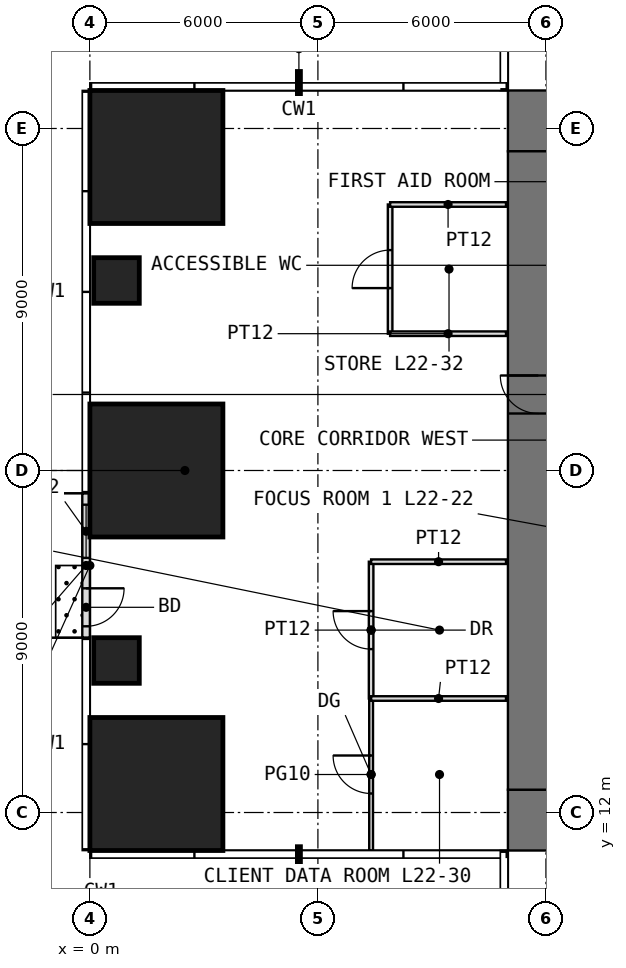
"""IFC4 building model, lengths in metres.
Left out: names, types, materials, properties, quantities, classifications, styles, units other than length and angle.
Written with IfcOpenShell. Run it as: python <this file> out.ifc"""

import sys

from ifc_helpers import new_model, si_unit, direction, frame, frame_2d, origin, origin_2d, place, context, subcontext, project, spatial, rectangle, extrude, element, fill, save


model = new_model("IFC4")
c1 = context("Model", 3, precision=1e-05, world=origin(), true_north=direction((0.0, 1.0)))
c2 = subcontext(c1, "Body", "Model", "MODEL_VIEW")
j1 = project(units=[si_unit("LENGTHUNIT", "METRE"), si_unit("PLANEANGLEUNIT", "RADIAN")], contexts=[c1])
p1 = place(None, origin())
s1 = spatial("IfcSite", under=j1, at=p1, CompositionType="ELEMENT")
p2 = place(p1, origin())
s2 = spatial("IfcBuilding", under=s1, at=p2, CompositionType="ELEMENT")
p3 = place(p2, frame((0.0, 0.0, 96.5)))
s3 = spatial("IfcBuildingStorey", under=s2, at=p3, CompositionType="ELEMENT", Elevation=96.5)
p4 = place(p3, frame((1.75, 12.75, 0.0), z_axis=(0.0, 0.0, 1.0), x_axis=(1.0, 0.0, 0.0)))
e1 = element("IfcColumn", 1, at=p4, inside=s3, PredefinedType="COLUMN", context=c2, shape_type="SweptSolid", body=[
    extrude(rectangle(XDim=3.5, YDim=3.5, at=origin_2d()), origin(), (0.0, 0.0, 1.0), 4.0),
])
p5 = place(p3, frame((0.7, 16.0, 0.0), z_axis=(0.0, 0.0, 1.0), x_axis=(1.0, 0.0, 0.0)))
e2 = element("IfcColumn", 2, at=p5, inside=s3, PredefinedType="COLUMN", context=c2, shape_type="SweptSolid", body=[
    extrude(rectangle(XDim=1.2, YDim=1.2, at=origin_2d()), origin(), (0.0, 0.0, 1.0), 4.0),
])
p6 = place(p3, frame((1.75, 21.0, 0.0), z_axis=(0.0, 0.0, 1.0), x_axis=(1.0, 0.0, 0.0)))
e3 = element("IfcColumn", 3, at=p6, inside=s3, PredefinedType="COLUMN", context=c2, shape_type="SweptSolid", body=[
    extrude(rectangle(XDim=3.5, YDim=3.5, at=origin_2d()), origin(), (0.0, 0.0, 1.0), 4.0),
])
p7 = place(p3, frame((0.7, 26.0, 0.0), z_axis=(0.0, 0.0, 1.0), x_axis=(1.0, 0.0, 0.0)))
e4 = element("IfcColumn", 4, at=p7, inside=s3, PredefinedType="COLUMN", context=c2, shape_type="SweptSolid", body=[
    extrude(rectangle(XDim=1.2, YDim=1.2, at=origin_2d()), origin(), (0.0, 0.0, 1.0), 4.0),
])
p8 = place(p3, frame((1.75, 29.25, 0.0), z_axis=(0.0, 0.0, 1.0), x_axis=(1.0, 0.0, 0.0)))
e5 = element("IfcColumn", 5, at=p8, inside=s3, PredefinedType="COLUMN", context=c2, shape_type="SweptSolid", body=[
    extrude(rectangle(XDim=3.5, YDim=3.5, at=origin_2d()), origin(), (0.0, 0.0, 1.0), 4.0),
])
p9 = place(p3, frame((-0.1, 20.4, 0.0), z_axis=(0.0, 0.0, 1.0), x_axis=(0.0, -1.0, 0.0)))
e6 = element("IfcWall", 6, at=p9, inside=s3, PredefinedType="USERDEFINED", context=c2, shape_type="SweptSolid", body=[
    extrude(rectangle(XDim=3.8, YDim=0.2, at=frame_2d((1.9, 0.0))), origin(), (0.0, 0.0, 1.0), 3.75),
])
p10 = place(p9, frame((2.5, 0.0, 0.0)))
e7 = element("IfcOpeningElement", 7, at=p10, cuts=e6, PredefinedType="OPENING", context=c2, shape_type="SweptSolid", body=[
    extrude(rectangle(XDim=1.0, YDim=2.4, at=frame_2d((0.5, 1.2))), frame((0.0, 0.11, 0.0), z_axis=(0.0, -1.0, 0.0), x_axis=(1.0, 0.0, 0.0)), (0.0, 0.0, 1.0), 0.22),
])
p11 = place(p9, frame((0.3, 0.0, 0.3)))
e8 = element("IfcOpeningElement", 8, at=p11, cuts=e6, PredefinedType="OPENING", context=c2, shape_type="SweptSolid", body=[
    extrude(rectangle(XDim=1.4, YDim=2.7, at=frame_2d((0.7, 1.35))), frame((0.0, 0.11, 0.0), z_axis=(0.0, -1.0, 0.0), x_axis=(1.0, 0.0, 0.0)), (0.0, 0.0, 1.0), 0.22),
])
p12 = place(p3, frame((11.0, 11.8, -0.05), z_axis=(0.0, 0.0, 1.0), x_axis=(1.0, 0.0, 0.0)))
e9 = element("IfcWall", 9, at=p12, inside=s3, PredefinedType="SHEAR", context=c2, shape_type="SweptSolid", body=[
    extrude(rectangle(XDim=20.0, YDim=1.6, at=frame_2d((10.0, 0.0))), origin(), (0.0, 0.0, 1.0), 4.0),
])
p13 = place(p12, frame((9.0, 0.0, 0.05)))
e10 = element("IfcOpeningElement", 10, at=p13, cuts=e9, PredefinedType="OPENING", context=c2, shape_type="SweptSolid", body=[
    extrude(rectangle(XDim=2.0, YDim=2.2, at=frame_2d((1.0, 1.1))), frame((0.0, 0.81, 0.0), z_axis=(0.0, -1.0, 0.0), x_axis=(1.0, 0.0, 0.0)), (0.0, 0.0, 1.0), 1.62),
])
p14 = place(p3, frame((11.0, 30.2, -0.05), z_axis=(0.0, 0.0, 1.0), x_axis=(1.0, 0.0, 0.0)))
e11 = element("IfcWall", 11, at=p14, inside=s3, PredefinedType="SHEAR", context=c2, shape_type="SweptSolid", body=[
    extrude(rectangle(XDim=20.0, YDim=1.6, at=frame_2d((10.0, 0.0))), origin(), (0.0, 0.0, 1.0), 4.0),
])
p15 = place(p14, frame((9.0, 0.0, 0.05)))
e12 = element("IfcOpeningElement", 12, at=p15, cuts=e11, PredefinedType="OPENING", context=c2, shape_type="SweptSolid", body=[
    extrude(rectangle(XDim=2.0, YDim=2.2, at=frame_2d((1.0, 1.1))), frame((0.0, 0.81, 0.0), z_axis=(0.0, -1.0, 0.0), x_axis=(1.0, 0.0, 0.0)), (0.0, 0.0, 1.0), 1.62),
])
p16 = place(p3, frame((11.8, 12.6, -0.05), z_axis=(0.0, 0.0, 1.0), x_axis=(0.0, 1.0, 0.0)))
e13 = element("IfcWall", 13, at=p16, inside=s3, PredefinedType="SHEAR", context=c2, shape_type="SweptSolid", body=[
    extrude(rectangle(XDim=16.8, YDim=1.6, at=frame_2d((8.4, 0.0))), origin(), (0.0, 0.0, 1.0), 4.0),
])
p17 = place(p16, frame((9.9, 0.0, 0.05)))
e14 = element("IfcOpeningElement", 14, at=p17, cuts=e13, PredefinedType="OPENING", context=c2, shape_type="SweptSolid", body=[
    extrude(rectangle(XDim=1.0, YDim=2.2, at=frame_2d((0.5, 1.1))), frame((0.0, 0.81, 0.0), z_axis=(0.0, -1.0, 0.0), x_axis=(1.0, 0.0, 0.0)), (0.0, 0.0, 1.0), 1.62),
])
p18 = place(p3, frame((7.4, 11.0, 0.0), z_axis=(0.0, 0.0, 1.0), x_axis=(0.0, 1.0, 0.0)))
e15 = element("IfcWall", 15, at=p18, inside=s3, PredefinedType="PARTITIONING", context=c2, shape_type="SweptSolid", body=[
    extrude(rectangle(XDim=4.0, YDim=0.1, at=frame_2d((2.0, 0.0))), origin(), (0.0, 0.0, 1.0), 3.75),
])
p19 = place(p18, frame((1.5, 0.0, 0.0)))
e16 = element("IfcOpeningElement", 16, at=p19, cuts=e15, PredefinedType="OPENING", context=c2, shape_type="SweptSolid", body=[
    extrude(rectangle(XDim=1.0, YDim=2.4, at=frame_2d((0.5, 1.2))), frame((0.0, 0.06, 0.0), z_axis=(0.0, -1.0, 0.0), x_axis=(1.0, 0.0, 0.0)), (0.0, 0.0, 1.0), 0.12),
])
p20 = place(p3, frame((7.4, 15.0, 0.0), z_axis=(0.0, 0.0, 1.0), x_axis=(0.0, 1.0, 0.0)))
e17 = element("IfcWall", 17, at=p20, inside=s3, PredefinedType="PARTITIONING", context=c2, shape_type="SweptSolid", body=[
    extrude(rectangle(XDim=3.6, YDim=0.12, at=frame_2d((1.8, 0.0))), origin(), (0.0, 0.0, 1.0), 3.75),
])
p21 = place(p20, frame((1.3, 0.0, 0.0)))
e18 = element("IfcOpeningElement", 18, at=p21, cuts=e17, PredefinedType="OPENING", context=c2, shape_type="SweptSolid", body=[
    extrude(rectangle(XDim=1.0, YDim=2.2, at=frame_2d((0.5, 1.1))), frame((0.0, 0.07, 0.0), z_axis=(0.0, -1.0, 0.0), x_axis=(1.0, 0.0, 0.0)), (0.0, 0.0, 1.0), 0.14),
])
for number, where, z_axis, x_axis in (
    (19, (7.4, 15.0, 0.0), (0.0, 0.0, 1.0), (1.0, 0.0, 0.0)),
    (20, (7.4, 18.6, 0.0), (0.0, 0.0, 1.0), (1.0, 0.0, 0.0)),
):
    element("IfcWall", number, at=place(p3, frame(where, z_axis=z_axis, x_axis=x_axis)), inside=s3, PredefinedType="PARTITIONING", context=c2, shape_type="SweptSolid", body=[
        extrude(rectangle(XDim=3.55, YDim=0.12, at=frame_2d((1.775, 0.0))), origin(), (0.0, 0.0, 1.0), 3.75),
    ])
p22 = place(p3, frame((7.9, 24.6, 0.0), z_axis=(0.0, 0.0, 1.0), x_axis=(0.0, 1.0, 0.0)))
e21 = element("IfcWall", 21, at=p22, inside=s3, PredefinedType="PARTITIONING", context=c2, shape_type="SweptSolid", body=[
    extrude(rectangle(XDim=3.4, YDim=0.12, at=frame_2d((1.7, 0.0))), origin(), (0.0, 0.0, 1.0), 3.75),
])
p23 = place(p22, frame((1.2, 0.0, 0.0)))
e22 = element("IfcOpeningElement", 22, at=p23, cuts=e21, PredefinedType="OPENING", context=c2, shape_type="SweptSolid", body=[
    extrude(rectangle(XDim=1.0, YDim=2.2, at=frame_2d((0.5, 1.1))), frame((0.0, 0.07, 0.0), z_axis=(0.0, -1.0, 0.0), x_axis=(1.0, 0.0, 0.0)), (0.0, 0.0, 1.0), 0.14),
])
for number, where, z_axis, x_axis in (
    (23, (7.9, 24.6, 0.0), (0.0, 0.0, 1.0), (1.0, 0.0, 0.0)),
    (24, (7.9, 28.0, 0.0), (0.0, 0.0, 1.0), (1.0, 0.0, 0.0)),
):
    element("IfcWall", number, at=place(p3, frame(where, z_axis=z_axis, x_axis=x_axis)), inside=s3, PredefinedType="PARTITIONING", context=c2, shape_type="SweptSolid", body=[
        extrude(rectangle(XDim=3.05, YDim=0.12, at=frame_2d((1.525, 0.0))), origin(), (0.0, 0.0, 1.0), 3.75),
    ])
p24 = place(p10, origin())
e25 = element("IfcDoor", 25, at=p24, inside=s3, OperationType="SINGLE_SWING_LEFT", PredefinedType="DOOR", context=c2, shape_type="SweptSolid", body=[
    extrude(rectangle(XDim=1.0, YDim=2.4, at=frame_2d((0.5, 1.2))), frame((0.0, 0.025, 0.0), z_axis=(0.0, -1.0, 0.0), x_axis=(1.0, 0.0, 0.0)), (0.0, 0.0, 1.0), 0.05),
])
fill(e7, e25)
p25 = place(p11, origin())
e26 = element("IfcWindow", 26, at=p25, inside=s3, PartitioningType="SINGLE_PANEL", PredefinedType="WINDOW", context=c2, shape_type="SweptSolid", body=[
    extrude(rectangle(XDim=1.4, YDim=2.7, at=frame_2d((0.7, 1.35))), frame((0.0, 0.03, 0.0), z_axis=(0.0, -1.0, 0.0), x_axis=(1.0, 0.0, 0.0)), (0.0, 0.0, 1.0), 0.06),
])
fill(e8, e26)
p26 = place(p17, origin())
e27 = element("IfcDoor", 27, at=p26, inside=s3, OperationType="SINGLE_SWING_RIGHT", PredefinedType="DOOR", context=c2, shape_type="SweptSolid", body=[
    extrude(rectangle(XDim=1.0, YDim=2.2, at=frame_2d((0.5, 1.1))), frame((0.0, 0.025, 0.0), z_axis=(0.0, -1.0, 0.0), x_axis=(1.0, 0.0, 0.0)), (0.0, 0.0, 1.0), 0.05),
])
fill(e14, e27)
p27 = place(p19, origin())
e28 = element("IfcDoor", 28, at=p27, inside=s3, OperationType="SINGLE_SWING_RIGHT", PredefinedType="DOOR", context=c2, shape_type="SweptSolid", body=[
    extrude(rectangle(XDim=1.0, YDim=2.4, at=frame_2d((0.5, 1.2))), frame((0.0, 0.025, 0.0), z_axis=(0.0, -1.0, 0.0), x_axis=(1.0, 0.0, 0.0)), (0.0, 0.0, 1.0), 0.05),
])
fill(e16, e28)
p28 = place(p21, origin())
e29 = element("IfcDoor", 29, at=p28, inside=s3, OperationType="SINGLE_SWING_RIGHT", PredefinedType="DOOR", context=c2, shape_type="SweptSolid", body=[
    extrude(rectangle(XDim=1.0, YDim=2.2, at=frame_2d((0.5, 1.1))), frame((0.0, 0.025, 0.0), z_axis=(0.0, -1.0, 0.0), x_axis=(1.0, 0.0, 0.0)), (0.0, 0.0, 1.0), 0.05),
])
fill(e18, e29)
p29 = place(p23, origin())
e30 = element("IfcDoor", 30, at=p29, inside=s3, OperationType="SINGLE_SWING_LEFT", PredefinedType="DOOR", context=c2, shape_type="SweptSolid", body=[
    extrude(rectangle(XDim=1.0, YDim=2.2, at=frame_2d((0.5, 1.1))), frame((0.0, 0.025, 0.0), z_axis=(0.0, -1.0, 0.0), x_axis=(1.0, 0.0, 0.0)), (0.0, 0.0, 1.0), 0.05),
])
fill(e22, e30)
save(model, sys.argv[1])
